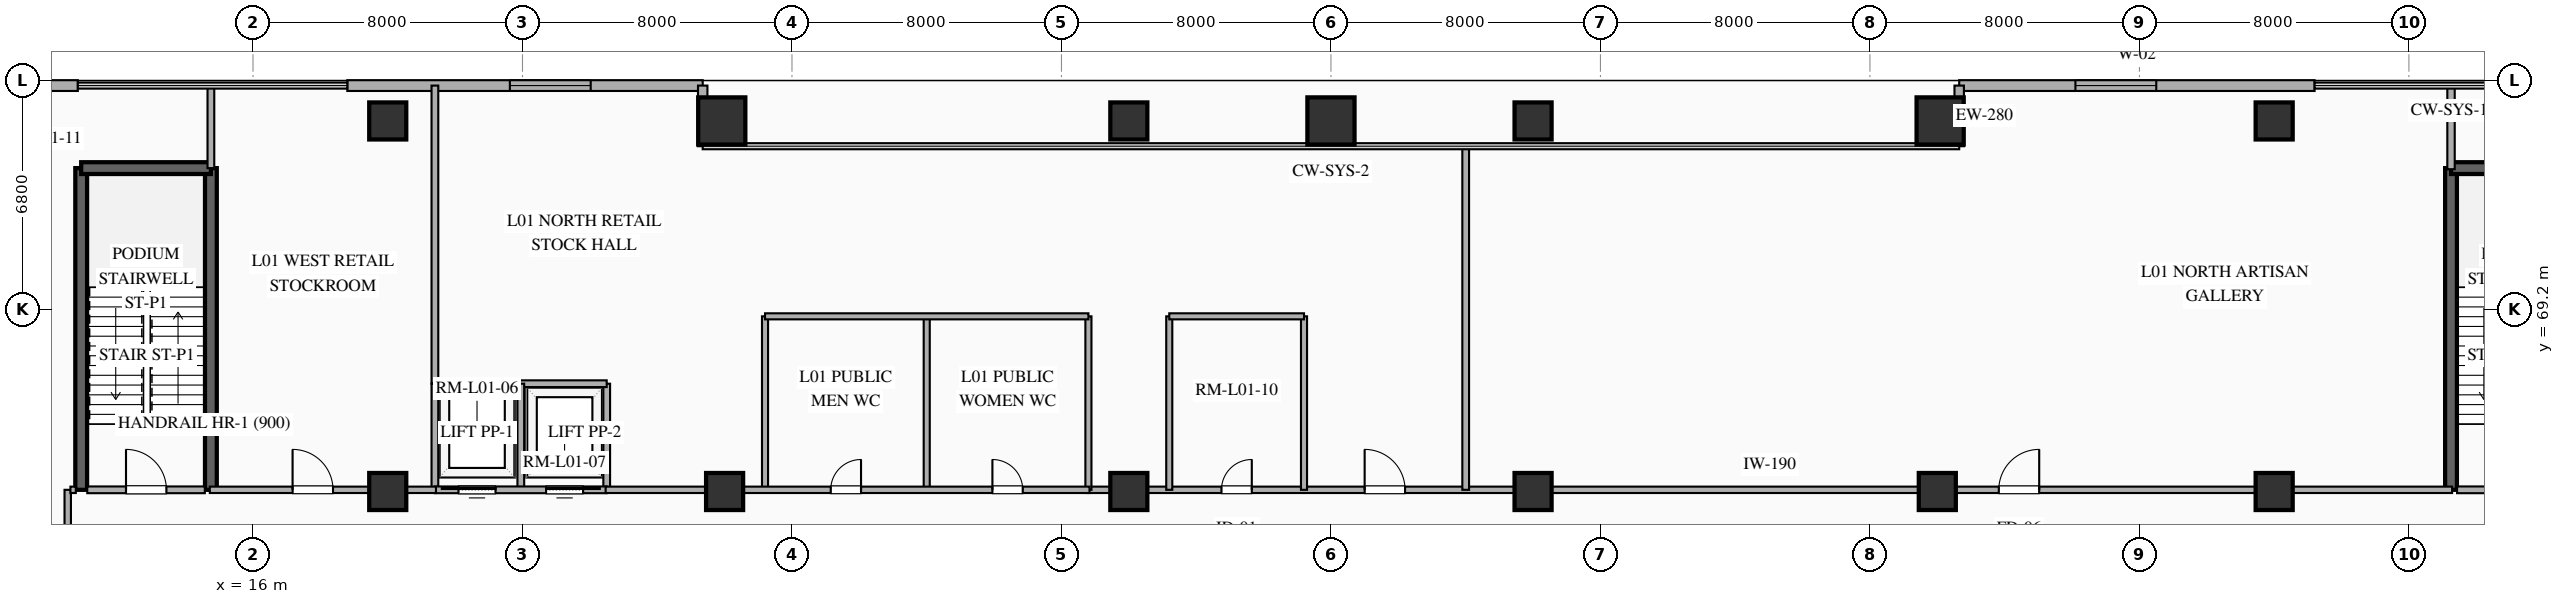
"""IFC4 building model, lengths in metres.
Left out: names, types, materials, properties, quantities, classifications, styles, units other than length and angle.
Written with IfcOpenShell. Run it as: python <this file> out.ifc"""

import sys

from ifc_helpers import new_model, si_unit, direction, frame, frame_2d, origin, origin_2d, place, context, subcontext, project, spatial, rectangle, extrude, element, fill, save


model = new_model("IFC4")
c1 = context("Model", 3, precision=1e-05, world=origin(), true_north=direction((0.0, 1.0)))
c2 = subcontext(c1, "Body", "Model", "MODEL_VIEW")
j1 = project(units=[si_unit("LENGTHUNIT", "METRE"), si_unit("PLANEANGLEUNIT", "RADIAN")], contexts=[c1])
p1 = place(None, origin())
s1 = spatial("IfcSite", under=j1, at=p1, CompositionType="ELEMENT")
p2 = place(p1, origin())
s2 = spatial("IfcBuilding", under=s1, at=p2, CompositionType="ELEMENT")
p3 = place(p2, frame((0.0, 0.0, 6.0)))
s3 = spatial("IfcBuildingStorey", under=s2, at=p3, CompositionType="ELEMENT", Elevation=6.0)
for number, where, z_axis, x_axis in (
    (1, (20.0, 74.8, 0.0), (0.0, 0.0, 1.0), (1.0, 0.0, 0.0)),
    (2, (20.0, 63.8, 0.0), (0.0, 0.0, 1.0), (1.0, 0.0, 0.0)),
    (3, (30.0, 63.8, 0.0), (0.0, 0.0, 1.0), (1.0, 0.0, 0.0)),
    (4, (42.0, 74.8, 0.0), (0.0, 0.0, 1.0), (1.0, 0.0, 0.0)),
    (5, (42.0, 63.8, 0.0), (0.0, 0.0, 1.0), (1.0, 0.0, 0.0)),
    (6, (54.0, 74.8, 0.0), (0.0, 0.0, 1.0), (1.0, 0.0, 0.0)),
    (7, (54.0, 63.8, 0.0), (0.0, 0.0, 1.0), (1.0, 0.0, 0.0)),
    (8, (66.0, 63.8, 0.0), (0.0, 0.0, 1.0), (1.0, 0.0, 0.0)),
    (9, (76.0, 74.8, 0.0), (0.0, 0.0, 1.0), (1.0, 0.0, 0.0)),
    (10, (76.0, 63.8, 0.0), (0.0, 0.0, 1.0), (1.0, 0.0, 0.0)),
):
    element("IfcColumn", number, at=place(p3, frame(where, z_axis=z_axis, x_axis=x_axis)), inside=s3, PredefinedType="COLUMN", context=c2, shape_type="SweptSolid", body=[
        extrude(rectangle(XDim=1.1, YDim=1.1, at=origin_2d()), origin(), (0.0, 0.0, 1.0), 5.12),
    ])
for number, where, z_axis, x_axis in (
    (11, (66.084, 74.8, 0.0), (0.0, 0.0, 1.0), (1.0, 0.0, 0.0)),
    (12, (48.0, 74.8, 0.0), (0.0, 0.0, 1.0), (1.0, 0.0, 0.0)),
    (13, (29.916, 74.8, 0.0), (0.0, 0.0, 1.0), (1.0, 0.0, 0.0)),
):
    element("IfcColumn", number, at=place(p3, frame(where, z_axis=z_axis, x_axis=x_axis)), inside=s3, PredefinedType="COLUMN", context=c2, shape_type="SweptSolid", body=[
        extrude(rectangle(XDim=1.4, YDim=1.4, at=origin_2d()), origin(), (0.0, 0.0, 1.0), 5.12),
    ])
for number, where, z_axis, x_axis in (
    (14, (10.9, 63.85, 0.0), (0.0, 0.0, 1.0), (0.0, 1.0, 0.0)),
    (15, (14.75, 63.85, 0.0), (0.0, 0.0, 1.0), (0.0, 1.0, 0.0)),
):
    element("IfcWall", number, at=place(p3, frame(where, z_axis=z_axis, x_axis=x_axis)), inside=s3, PredefinedType="SHEAR", context=c2, shape_type="SweptSolid", body=[
        extrude(rectangle(XDim=9.55, YDim=0.35, at=frame_2d((4.775, 0.0))), origin(), (0.0, 0.0, 1.0), 5.12),
    ])
p4 = place(p3, frame((10.9, 73.4, 0.0), z_axis=(0.0, 0.0, 1.0), x_axis=(1.0, 0.0, 0.0)))
e16 = element("IfcWall", 16, at=p4, inside=s3, PredefinedType="SHEAR", context=c2, shape_type="SweptSolid", body=[
    extrude(rectangle(XDim=3.85, YDim=0.35, at=frame_2d((1.925, 0.0))), origin(), (0.0, 0.0, 1.0), 5.12),
])
p5 = place(p3, frame((81.25, 63.85, 0.0), z_axis=(0.0, 0.0, 1.0), x_axis=(0.0, 1.0, 0.0)))
e17 = element("IfcWall", 17, at=p5, inside=s3, PredefinedType="SHEAR", context=c2, shape_type="SweptSolid", body=[
    extrude(rectangle(XDim=9.55, YDim=0.35, at=frame_2d((4.775, 0.0))), origin(), (0.0, 0.0, 1.0), 5.12),
])
p6 = place(p3, frame((81.25, 73.4, 0.0), z_axis=(0.0, 0.0, 1.0), x_axis=(1.0, 0.0, 0.0)))
e18 = element("IfcWall", 18, at=p6, inside=s3, PredefinedType="SHEAR", context=c2, shape_type="SweptSolid", body=[
    extrude(rectangle(XDim=3.8, YDim=0.35, at=frame_2d((1.9, 0.0))), origin(), (0.0, 0.0, 1.0), 5.12),
])
p7 = place(p3, frame((10.8, 75.85, 0.0), z_axis=(0.0, 0.0, 1.0), x_axis=(-1.0, 0.0, 0.0)))
e19 = element("IfcWall", 19, at=p7, inside=s3, PredefinedType="SOLIDWALL", context=c2, shape_type="SweptSolid", body=[
    extrude(rectangle(XDim=1.15, YDim=0.32, at=frame_2d((0.575, 0.0))), origin(), (0.0, 0.0, 1.0), 5.12),
])
p8 = place(p3, frame((66.65, 75.85, 0.0), z_axis=(0.0, 0.0, 1.0), x_axis=(1.0, 0.0, 0.0)))
e20 = element("IfcWall", 20, at=p8, inside=s3, PredefinedType="SOLIDWALL", context=c2, shape_type="SweptSolid", body=[
    extrude(rectangle(XDim=10.55, YDim=0.32, at=frame_2d((5.275, 0.0))), origin(), (0.0, 0.0, 1.0), 5.12),
])
p9 = place(p8, frame((3.45, 0.0, 0.9)))
e21 = element("IfcOpeningElement", 21, at=p9, cuts=e20, PredefinedType="OPENING", context=c2, shape_type="SweptSolid", body=[
    extrude(rectangle(XDim=2.4, YDim=2.6, at=frame_2d((1.2, 1.3))), frame((0.0, 0.17, 0.0), z_axis=(0.0, -1.0, 0.0), x_axis=(1.0, 0.0, 0.0)), (0.0, 0.0, 1.0), 0.34),
])
p10 = place(p3, frame((18.8, 75.85, 0.0), z_axis=(0.0, 0.0, 1.0), x_axis=(1.0, 0.0, 0.0)))
e22 = element("IfcWall", 22, at=p10, inside=s3, PredefinedType="SOLIDWALL", context=c2, shape_type="SweptSolid", body=[
    extrude(rectangle(XDim=10.55, YDim=0.32, at=frame_2d((5.275, 0.0))), origin(), (0.0, 0.0, 1.0), 5.12),
])
p11 = place(p10, frame((4.825, 0.0, 0.9)))
e23 = element("IfcOpeningElement", 23, at=p11, cuts=e22, PredefinedType="OPENING", context=c2, shape_type="SweptSolid", body=[
    extrude(rectangle(XDim=2.4, YDim=2.6, at=frame_2d((1.2, 1.3))), frame((0.0, 0.17, 0.0), z_axis=(0.0, -1.0, 0.0), x_axis=(1.0, 0.0, 0.0)), (0.0, 0.0, 1.0), 0.34),
])
for number, where, z_axis, x_axis in (
    (24, (66.65, 75.85, 0.0), (0.0, 0.0, 1.0), (0.0, -1.0, 0.0)),
    (25, (29.35, 74.05, 0.0), (0.0, 0.0, 1.0), (0.0, 1.0, 0.0)),
):
    element("IfcWall", number, at=place(p3, frame(where, z_axis=z_axis, x_axis=x_axis)), inside=s3, PredefinedType="SOLIDWALL", context=c2, shape_type="SweptSolid", body=[
        extrude(rectangle(XDim=1.8, YDim=0.28, at=frame_2d((0.9, 0.0))), origin(), (0.0, 0.0, 1.0), 5.12),
    ])
p12 = place(p3, frame((11.08, 63.85, 0.0), z_axis=(0.0, 0.0, 1.0), x_axis=(1.0, 0.0, 0.0)))
e26 = element("IfcWall", 26, at=p12, inside=s3, PredefinedType="SOLIDWALL", context=c2, shape_type="SweptSolid", body=[
    extrude(rectangle(XDim=3.49, YDim=0.2, at=frame_2d((1.745, 0.0))), origin(), (0.0, 0.0, 1.0), 4.32),
])
p13 = place(p12, frame((1.15, 0.0, 0.0)))
e27 = element("IfcOpeningElement", 27, at=p13, cuts=e26, PredefinedType="OPENING", context=c2, shape_type="SweptSolid", body=[
    extrude(rectangle(XDim=1.2, YDim=2.15, at=frame_2d((0.6, 1.075))), frame((0.0, 0.11, 0.0), z_axis=(0.0, -1.0, 0.0), x_axis=(1.0, 0.0, 0.0)), (0.0, 0.0, 1.0), 0.22),
])
p14 = place(p3, frame((81.43, 63.85, 0.0), z_axis=(0.0, 0.0, 1.0), x_axis=(1.0, 0.0, 0.0)))
e28 = element("IfcWall", 28, at=p14, inside=s3, PredefinedType="SOLIDWALL", context=c2, shape_type="SweptSolid", body=[
    extrude(rectangle(XDim=3.44, YDim=0.2, at=frame_2d((1.72, 0.0))), origin(), (0.0, 0.0, 1.0), 4.32),
])
p15 = place(p14, frame((1.12, 0.0, 0.0)))
e29 = element("IfcOpeningElement", 29, at=p15, cuts=e28, PredefinedType="OPENING", context=c2, shape_type="SweptSolid", body=[
    extrude(rectangle(XDim=1.2, YDim=2.15, at=frame_2d((0.6, 1.075))), frame((0.0, 0.11, 0.0), z_axis=(0.0, -1.0, 0.0), x_axis=(1.0, 0.0, 0.0)), (0.0, 0.0, 1.0), 0.22),
])
for number, where, z_axis, x_axis in (
    (30, (21.4, 63.85, 0.0), (0.0, 0.0, 1.0), (0.0, 1.0, 0.0)),
    (31, (26.5, 63.85, 0.0), (0.0, 0.0, 1.0), (0.0, 1.0, 0.0)),
):
    element("IfcWall", number, at=place(p3, frame(where, z_axis=z_axis, x_axis=x_axis)), inside=s3, PredefinedType="SOLIDWALL", context=c2, shape_type="SweptSolid", body=[
        extrude(rectangle(XDim=3.15, YDim=0.2, at=frame_2d((1.575, 0.0))), origin(), (0.0, 0.0, 1.0), 4.32),
    ])
p16 = place(p3, frame((21.4, 67.0, 0.0), z_axis=(0.0, 0.0, 1.0), x_axis=(1.0, 0.0, 0.0)))
e32 = element("IfcWall", 32, at=p16, inside=s3, PredefinedType="SOLIDWALL", context=c2, shape_type="SweptSolid", body=[
    extrude(rectangle(XDim=5.1, YDim=0.2, at=frame_2d((2.55, 0.0))), origin(), (0.0, 0.0, 1.0), 4.32),
])
p17 = place(p3, frame((23.95, 63.85, 0.0), z_axis=(0.0, 0.0, 1.0), x_axis=(0.0, 1.0, 0.0)))
e33 = element("IfcWall", 33, at=p17, inside=s3, PredefinedType="SOLIDWALL", context=c2, shape_type="SweptSolid", body=[
    extrude(rectangle(XDim=3.15, YDim=0.2, at=frame_2d((1.575, 0.0))), origin(), (0.0, 0.0, 1.0), 4.32),
])
p18 = place(p3, frame((21.4, 63.85, 0.0), z_axis=(0.0, 0.0, 1.0), x_axis=(1.0, 0.0, 0.0)))
e34 = element("IfcWall", 34, at=p18, inside=s3, PredefinedType="SOLIDWALL", context=c2, shape_type="SweptSolid", body=[
    extrude(rectangle(XDim=5.1, YDim=0.2, at=frame_2d((2.55, 0.0))), origin(), (0.0, 0.0, 1.0), 4.32),
])
p19 = place(p18, frame((0.7, 0.0, 0.0)))
e35 = element("IfcOpeningElement", 35, at=p19, cuts=e34, PredefinedType="OPENING", context=c2, shape_type="SweptSolid", body=[
    extrude(rectangle(XDim=1.1, YDim=2.2, at=frame_2d((0.55, 1.1))), frame((0.0, 0.11, 0.0), z_axis=(0.0, -1.0, 0.0), x_axis=(1.0, 0.0, 0.0)), (0.0, 0.0, 1.0), 0.22),
])
p20 = place(p18, frame((3.3, 0.0, 0.0)))
e36 = element("IfcOpeningElement", 36, at=p20, cuts=e34, PredefinedType="OPENING", context=c2, shape_type="SweptSolid", body=[
    extrude(rectangle(XDim=1.1, YDim=2.2, at=frame_2d((0.55, 1.1))), frame((0.0, 0.11, 0.0), z_axis=(0.0, -1.0, 0.0), x_axis=(1.0, 0.0, 0.0)), (0.0, 0.0, 1.0), 0.22),
])
p21 = place(p3, frame((40.768, 63.85, 0.0), z_axis=(0.0, 0.0, 1.0), x_axis=(1.0, 0.0, 0.0)))
e37 = element("IfcWall", 37, at=p21, inside=s3, PredefinedType="PARTITIONING", context=c2, shape_type="SweptSolid", body=[
    extrude(rectangle(XDim=40.514, YDim=0.19, at=frame_2d((20.257, 0.0))), origin(), (0.0, 0.0, 1.0), 4.32),
])
p22 = place(p21, frame((27.057, 0.0, 0.0)))
e38 = element("IfcOpeningElement", 38, at=p22, cuts=e37, PredefinedType="OPENING", context=c2, shape_type="SweptSolid", body=[
    extrude(rectangle(XDim=1.2, YDim=2.25, at=frame_2d((0.6, 1.125))), frame((0.0, 0.105, 0.0), z_axis=(0.0, -1.0, 0.0), x_axis=(1.0, 0.0, 0.0)), (0.0, 0.0, 1.0), 0.21),
])
p23 = place(p21, frame((8.232, 0.0, 0.0)))
e39 = element("IfcOpeningElement", 39, at=p23, cuts=e37, PredefinedType="OPENING", context=c2, shape_type="SweptSolid", body=[
    extrude(rectangle(XDim=1.2, YDim=2.25, at=frame_2d((0.6, 1.125))), frame((0.0, 0.105, 0.0), z_axis=(0.0, -1.0, 0.0), x_axis=(1.0, 0.0, 0.0)), (0.0, 0.0, 1.0), 0.21),
])
p24 = place(p21, frame((3.982, 0.0, 0.0)))
e40 = element("IfcOpeningElement", 40, at=p24, cuts=e37, PredefinedType="OPENING", context=c2, shape_type="SweptSolid", body=[
    extrude(rectangle(XDim=0.9, YDim=2.1, at=frame_2d((0.45, 1.05))), frame((0.0, 0.105, 0.0), z_axis=(0.0, -1.0, 0.0), x_axis=(1.0, 0.0, 0.0)), (0.0, 0.0, 1.0), 0.21),
])
p25 = place(p3, frame((52.0, 74.05, 0.0), z_axis=(0.0, 0.0, 1.0), x_axis=(0.0, -1.0, 0.0)))
e41 = element("IfcWall", 41, at=p25, inside=s3, PredefinedType="PARTITIONING", context=c2, shape_type="SweptSolid", body=[
    extrude(rectangle(XDim=10.2, YDim=0.2, at=frame_2d((5.1, 0.0))), origin(), (0.0, 0.0, 1.0), 4.32),
])
p26 = place(p3, frame((21.4, 67.0, 0.0), z_axis=(0.0, 0.0, 1.0), x_axis=(0.0, 1.0, 0.0)))
e42 = element("IfcWall", 42, at=p26, inside=s3, PredefinedType="PARTITIONING", context=c2, shape_type="SweptSolid", body=[
    extrude(rectangle(XDim=8.85, YDim=0.2, at=frame_2d((4.425, 0.0))), origin(), (0.0, 0.0, 1.0), 4.32),
])
p27 = place(p3, frame((14.718, 63.85, 0.0), z_axis=(0.0, 0.0, 1.0), x_axis=(1.0, 0.0, 0.0)))
e43 = element("IfcWall", 43, at=p27, inside=s3, PredefinedType="PARTITIONING", context=c2, shape_type="SweptSolid", body=[
    extrude(rectangle(XDim=6.714, YDim=0.19, at=frame_2d((3.357, 0.0))), origin(), (0.0, 0.0, 1.0), 4.32),
])
p28 = place(p27, frame((2.457, 0.0, 0.0)))
e44 = element("IfcOpeningElement", 44, at=p28, cuts=e43, PredefinedType="OPENING", context=c2, shape_type="SweptSolid", body=[
    extrude(rectangle(XDim=1.2, YDim=2.25, at=frame_2d((0.6, 1.125))), frame((0.0, 0.105, 0.0), z_axis=(0.0, -1.0, 0.0), x_axis=(1.0, 0.0, 0.0)), (0.0, 0.0, 1.0), 0.21),
])
for number, where, z_axis, x_axis in (
    (45, (36.0, 69.0, 0.0), (0.0, 0.0, 1.0), (0.0, -1.0, 0.0)),
    (46, (31.2, 63.85, 0.0), (0.0, 0.0, 1.0), (0.0, 1.0, 0.0)),
    (47, (40.8, 69.0, 0.0), (0.0, 0.0, 1.0), (0.0, -1.0, 0.0)),
    (48, (43.2, 63.85, 0.0), (0.0, 0.0, 1.0), (0.0, 1.0, 0.0)),
    (49, (47.2, 69.0, 0.0), (0.0, 0.0, 1.0), (0.0, -1.0, 0.0)),
):
    element("IfcWall", number, at=place(p3, frame(where, z_axis=z_axis, x_axis=x_axis)), inside=s3, PredefinedType="PLUMBINGWALL", context=c2, shape_type="SweptSolid", body=[
        extrude(rectangle(XDim=5.15, YDim=0.18, at=frame_2d((2.575, 0.0))), origin(), (0.0, 0.0, 1.0), 4.32),
    ])
p29 = place(p3, frame((26.468, 63.85, 0.0), z_axis=(0.0, 0.0, 1.0), x_axis=(1.0, 0.0, 0.0)))
e50 = element("IfcWall", 50, at=p29, inside=s3, PredefinedType="PARTITIONING", context=c2, shape_type="SweptSolid", body=[
    extrude(rectangle(XDim=14.364, YDim=0.19, at=frame_2d((7.182, 0.0))), origin(), (0.0, 0.0, 1.0), 4.32),
])
p30 = place(p29, frame((6.682, 0.0, 0.0)))
e51 = element("IfcOpeningElement", 51, at=p30, cuts=e50, PredefinedType="OPENING", context=c2, shape_type="SweptSolid", body=[
    extrude(rectangle(XDim=0.9, YDim=2.1, at=frame_2d((0.45, 1.05))), frame((0.0, 0.105, 0.0), z_axis=(0.0, -1.0, 0.0), x_axis=(1.0, 0.0, 0.0)), (0.0, 0.0, 1.0), 0.21),
])
p31 = place(p29, frame((11.482, 0.0, 0.0)))
e52 = element("IfcOpeningElement", 52, at=p31, cuts=e50, PredefinedType="OPENING", context=c2, shape_type="SweptSolid", body=[
    extrude(rectangle(XDim=0.9, YDim=2.1, at=frame_2d((0.45, 1.05))), frame((0.0, 0.105, 0.0), z_axis=(0.0, -1.0, 0.0), x_axis=(1.0, 0.0, 0.0)), (0.0, 0.0, 1.0), 0.21),
])
p32 = place(p3, frame((31.2, 69.0, 0.0), z_axis=(0.0, 0.0, 1.0), x_axis=(1.0, 0.0, 0.0)))
e53 = element("IfcWall", 53, at=p32, inside=s3, PredefinedType="PLUMBINGWALL", context=c2, shape_type="SweptSolid", body=[
    extrude(rectangle(XDim=9.6, YDim=0.18, at=frame_2d((4.8, 0.0))), origin(), (0.0, 0.0, 1.0), 4.32),
])
p33 = place(p3, frame((43.2, 69.0, 0.0), z_axis=(0.0, 0.0, 1.0), x_axis=(1.0, 0.0, 0.0)))
e54 = element("IfcWall", 54, at=p33, inside=s3, PredefinedType="PLUMBINGWALL", context=c2, shape_type="SweptSolid", body=[
    extrude(rectangle(XDim=4.0, YDim=0.18, at=frame_2d((2.0, 0.0))), origin(), (0.0, 0.0, 1.0), 4.32),
])
p34 = place(p3, frame((10.5, 60.8, 0.0), z_axis=(0.0, 0.0, 1.0), x_axis=(0.0, 1.0, 0.0)))
e55 = element("IfcWall", 55, at=p34, inside=s3, PredefinedType="PARTITIONING", context=c2, shape_type="SweptSolid", body=[
    extrude(rectangle(XDim=3.05, YDim=0.19, at=frame_2d((1.525, 0.0))), origin(), (0.0, 0.0, 1.0), 4.32),
])
p35 = place(p34, frame((0.625, 0.0, 0.0)))
e56 = element("IfcOpeningElement", 56, at=p35, cuts=e55, PredefinedType="OPENING", context=c2, shape_type="SweptSolid", body=[
    extrude(rectangle(XDim=1.2, YDim=2.25, at=frame_2d((0.6, 1.125))), frame((0.0, 0.105, 0.0), z_axis=(0.0, -1.0, 0.0), x_axis=(1.0, 0.0, 0.0)), (0.0, 0.0, 1.0), 0.21),
])
p36 = place(p3, frame((81.25, 75.85, 0.0), z_axis=(0.0, 0.0, 1.0), x_axis=(0.0, -1.0, 0.0)))
e57 = element("IfcWall", 57, at=p36, inside=s3, PredefinedType="SOLIDWALL", context=c2, shape_type="SweptSolid", body=[
    extrude(rectangle(XDim=2.482, YDim=0.22, at=frame_2d((1.241, 0.0))), origin(), (0.0, 0.0, 1.0), 4.32),
])
p37 = place(p3, frame((14.75, 75.85, 0.0), z_axis=(0.0, 0.0, 1.0), x_axis=(0.0, -1.0, 0.0)))
e58 = element("IfcWall", 58, at=p37, inside=s3, PredefinedType="PARTITIONING", context=c2, shape_type="SweptSolid", body=[
    extrude(rectangle(XDim=2.45, YDim=0.2, at=frame_2d((1.225, 0.0))), origin(), (0.0, 0.0, 1.0), 4.32),
])
p38 = place(p3, frame((10.58, 63.85, 0.0), z_axis=(0.0, 0.0, 1.0), x_axis=(1.0, 0.0, 0.0)))
e59 = element("IfcWall", 59, at=p38, inside=s3, PredefinedType="PARTITIONING", context=c2, shape_type="SweptSolid", body=[
    extrude(rectangle(XDim=0.16, YDim=0.19, at=frame_2d((0.08, 0.0))), origin(), (0.0, 0.0, 1.0), 4.32),
])
p39 = place(p9, origin())
e60 = element("IfcWindow", 60, at=p39, inside=s3, PartitioningType="SINGLE_PANEL", PredefinedType="WINDOW", context=c2, shape_type="SweptSolid", body=[
    extrude(rectangle(XDim=2.4, YDim=2.6, at=frame_2d((1.2, 1.3))), frame((0.0, 0.03, 0.0), z_axis=(0.0, -1.0, 0.0), x_axis=(1.0, 0.0, 0.0)), (0.0, 0.0, 1.0), 0.06),
])
fill(e21, e60)
p40 = place(p11, origin())
e61 = element("IfcWindow", 61, at=p40, inside=s3, PartitioningType="SINGLE_PANEL", PredefinedType="WINDOW", context=c2, shape_type="SweptSolid", body=[
    extrude(rectangle(XDim=2.4, YDim=2.6, at=frame_2d((1.2, 1.3))), frame((0.0, 0.03, 0.0), z_axis=(0.0, -1.0, 0.0), x_axis=(1.0, 0.0, 0.0)), (0.0, 0.0, 1.0), 0.06),
])
fill(e23, e61)
p41 = place(p13, origin())
e62 = element("IfcDoor", 62, at=p41, inside=s3, OperationType="SINGLE_SWING_LEFT", PredefinedType="DOOR", context=c2, shape_type="SweptSolid", body=[
    extrude(rectangle(XDim=1.2, YDim=2.15, at=frame_2d((0.6, 1.075))), frame((0.0, 0.025, 0.0), z_axis=(0.0, -1.0, 0.0), x_axis=(1.0, 0.0, 0.0)), (0.0, 0.0, 1.0), 0.05),
])
fill(e27, e62)
p42 = place(p19, origin())
e63 = element("IfcDoor", 63, at=p42, inside=s3, OperationType="SLIDING_TO_LEFT", PredefinedType="DOOR", context=c2, shape_type="SweptSolid", body=[
    extrude(rectangle(XDim=1.1, YDim=2.2, at=frame_2d((0.55, 1.1))), frame((0.0, 0.025, 0.0), z_axis=(0.0, -1.0, 0.0), x_axis=(1.0, 0.0, 0.0)), (0.0, 0.0, 1.0), 0.05),
])
fill(e35, e63)
p43 = place(p20, origin())
e64 = element("IfcDoor", 64, at=p43, inside=s3, OperationType="SLIDING_TO_RIGHT", PredefinedType="DOOR", context=c2, shape_type="SweptSolid", body=[
    extrude(rectangle(XDim=1.1, YDim=2.2, at=frame_2d((0.55, 1.1))), frame((0.0, 0.025, 0.0), z_axis=(0.0, -1.0, 0.0), x_axis=(1.0, 0.0, 0.0)), (0.0, 0.0, 1.0), 0.05),
])
fill(e36, e64)
p44 = place(p22, origin())
e65 = element("IfcDoor", 65, at=p44, inside=s3, OperationType="SINGLE_SWING_RIGHT", PredefinedType="DOOR", context=c2, shape_type="SweptSolid", body=[
    extrude(rectangle(XDim=1.2, YDim=2.25, at=frame_2d((0.6, 1.125))), frame((0.0, 0.025, 0.0), z_axis=(0.0, -1.0, 0.0), x_axis=(1.0, 0.0, 0.0)), (0.0, 0.0, 1.0), 0.05),
])
fill(e38, e65)
p45 = place(p23, origin())
e66 = element("IfcDoor", 66, at=p45, inside=s3, OperationType="SINGLE_SWING_LEFT", PredefinedType="DOOR", context=c2, shape_type="SweptSolid", body=[
    extrude(rectangle(XDim=1.2, YDim=2.25, at=frame_2d((0.6, 1.125))), frame((0.0, 0.025, 0.0), z_axis=(0.0, -1.0, 0.0), x_axis=(1.0, 0.0, 0.0)), (0.0, 0.0, 1.0), 0.05),
])
fill(e39, e66)
p46 = place(p24, origin())
e67 = element("IfcDoor", 67, at=p46, inside=s3, OperationType="SINGLE_SWING_RIGHT", PredefinedType="DOOR", context=c2, shape_type="SweptSolid", body=[
    extrude(rectangle(XDim=0.9, YDim=2.1, at=frame_2d((0.45, 1.05))), frame((0.0, 0.025, 0.0), z_axis=(0.0, -1.0, 0.0), x_axis=(1.0, 0.0, 0.0)), (0.0, 0.0, 1.0), 0.05),
])
fill(e40, e67)
p47 = place(p28, origin())
e68 = element("IfcDoor", 68, at=p47, inside=s3, OperationType="SINGLE_SWING_LEFT", PredefinedType="DOOR", context=c2, shape_type="SweptSolid", body=[
    extrude(rectangle(XDim=1.2, YDim=2.25, at=frame_2d((0.6, 1.125))), frame((0.0, 0.025, 0.0), z_axis=(0.0, -1.0, 0.0), x_axis=(1.0, 0.0, 0.0)), (0.0, 0.0, 1.0), 0.05),
])
fill(e44, e68)
p48 = place(p30, origin())
e69 = element("IfcDoor", 69, at=p48, inside=s3, OperationType="SINGLE_SWING_RIGHT", PredefinedType="DOOR", context=c2, shape_type="SweptSolid", body=[
    extrude(rectangle(XDim=0.9, YDim=2.1, at=frame_2d((0.45, 1.05))), frame((0.0, 0.025, 0.0), z_axis=(0.0, -1.0, 0.0), x_axis=(1.0, 0.0, 0.0)), (0.0, 0.0, 1.0), 0.05),
])
fill(e51, e69)
p49 = place(p31, origin())
e70 = element("IfcDoor", 70, at=p49, inside=s3, OperationType="SINGLE_SWING_LEFT", PredefinedType="DOOR", context=c2, shape_type="SweptSolid", body=[
    extrude(rectangle(XDim=0.9, YDim=2.1, at=frame_2d((0.45, 1.05))), frame((0.0, 0.025, 0.0), z_axis=(0.0, -1.0, 0.0), x_axis=(1.0, 0.0, 0.0)), (0.0, 0.0, 1.0), 0.05),
])
fill(e52, e70)
save(model, sys.argv[1])
